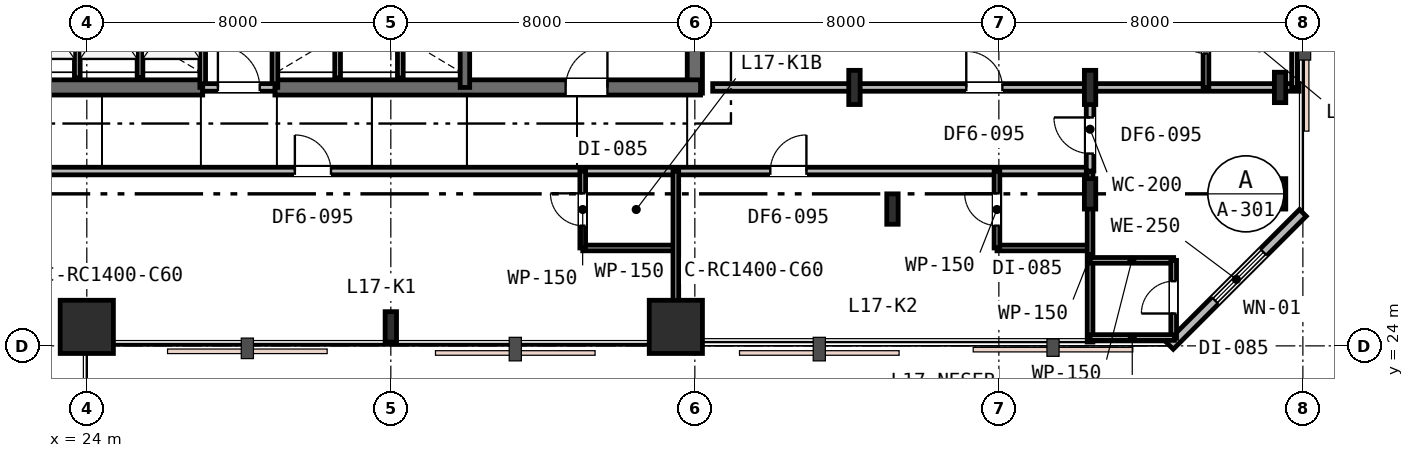
"""IFC4 building model, lengths in metres.
Left out: names, types, materials, properties, quantities, classifications, styles, units other than length and angle.
Written with IfcOpenShell. Run it as: python <this file> out.ifc"""

import sys

from ifc_helpers import new_model, si_unit, direction, frame, frame_2d, origin, origin_2d, place, context, subcontext, project, spatial, rectangle, i_section, extrude, element, fill, save


model = new_model("IFC4")
c1 = context("Model", 3, precision=1e-05, world=origin(), true_north=direction((0.0, 1.0)))
c2 = subcontext(c1, "Body", "Model", "MODEL_VIEW")
j1 = project(units=[si_unit("LENGTHUNIT", "METRE"), si_unit("PLANEANGLEUNIT", "RADIAN")], contexts=[c1])
p1 = place(None, origin())
s1 = spatial("IfcSite", under=j1, at=p1, CompositionType="ELEMENT")
p2 = place(p1, origin())
s2 = spatial("IfcBuilding", under=s1, at=p2, CompositionType="ELEMENT")
p3 = place(p2, frame((0.0, 0.0, 69.0)))
s3 = spatial("IfcBuildingStorey", under=s2, at=p3, CompositionType="ELEMENT", Elevation=69.0)
p4 = place(p3, frame((40.0, 30.65, 0.0), z_axis=(0.0, 0.0, 1.0), x_axis=(0.0, 1.0, 0.0)))
e1 = element("IfcWall", 1, at=p4, inside=s3, PredefinedType="SHEAR", context=c2, shape_type="SweptSolid", body=[
    extrude(rectangle(XDim=12.3, YDim=0.4, at=frame_2d((6.15, 0.0))), origin(), (0.0, 0.0, 1.0), 3.6),
])
p5 = place(p3, frame((15.85, 30.8, 0.0), z_axis=(0.0, 0.0, 1.0), x_axis=(1.0, 0.0, 0.0)))
e2 = element("IfcWall", 2, at=p5, inside=s3, PredefinedType="SHEAR", context=c2, shape_type="SweptSolid", body=[
    extrude(rectangle(XDim=11.2, YDim=0.4, at=frame_2d((5.6, 0.0))), origin(), (0.0, 0.0, 1.0), 3.6),
])
p6 = place(p5, frame((2.45, 0.0, 0.0)))
e3 = element("IfcOpeningElement", 3, at=p6, cuts=e2, PredefinedType="OPENING", context=c2, shape_type="SweptSolid", body=[
    extrude(rectangle(XDim=1.1, YDim=2.15, at=frame_2d((0.55, 1.075))), frame((0.0, 0.21, 0.0), z_axis=(0.0, -1.0, 0.0), x_axis=(1.0, 0.0, 0.0)), (0.0, 0.0, 1.0), 0.42),
])
p7 = place(p3, frame((28.95, 30.8, 0.0), z_axis=(0.0, 0.0, 1.0), x_axis=(1.0, 0.0, 0.0)))
e4 = element("IfcWall", 4, at=p7, inside=s3, PredefinedType="SHEAR", context=c2, shape_type="SweptSolid", body=[
    extrude(rectangle(XDim=11.2, YDim=0.4, at=frame_2d((5.6, 0.0))), origin(), (0.0, 0.0, 1.0), 3.6),
])
p8 = place(p7, frame((7.65, 0.0, 0.0)))
e5 = element("IfcOpeningElement", 5, at=p8, cuts=e4, PredefinedType="OPENING", context=c2, shape_type="SweptSolid", body=[
    extrude(rectangle(XDim=1.1, YDim=2.15, at=frame_2d((0.55, 1.075))), frame((0.0, 0.21, 0.0), z_axis=(0.0, -1.0, 0.0), x_axis=(1.0, 0.0, 0.0)), (0.0, 0.0, 1.0), 0.42),
])
p9 = place(p3, frame((33.95, 30.8, 0.0), z_axis=(0.0, 0.0, 1.0), x_axis=(0.0, 1.0, 0.0)))
e6 = element("IfcWall", 6, at=p9, inside=s3, PredefinedType="SHEAR", context=c2, shape_type="SweptSolid", body=[
    extrude(rectangle(XDim=6.45, YDim=0.25, at=frame_2d((3.225, 0.0))), origin(), (0.0, 0.0, 1.0), 3.6),
])
p10 = place(p3, frame((24.0, 24.5, 0.0), z_axis=(0.0, 0.0, 1.0), x_axis=(1.0, 0.0, 0.0)))
e7 = element("IfcColumn", 7, at=p10, inside=s3, PredefinedType="COLUMN", context=c2, shape_type="SweptSolid", body=[
    extrude(rectangle(XDim=1.4, YDim=1.4, at=origin_2d()), origin(), (0.0, 0.0, 1.0), 3.6),
])
p11 = place(p3, frame((32.0, 24.5, 0.0), z_axis=(0.0, 0.0, 1.0), x_axis=(1.0, 0.0, 0.0)))
e8 = element("IfcColumn", 8, at=p11, inside=s3, PredefinedType="COLUMN", context=c2, shape_type="SweptSolid", body=[
    extrude(i_section(OverallWidth=0.3, OverallDepth=0.8, WebThickness=0.018, FlangeThickness=0.033, FilletRadius=0.03, at=origin_2d()), origin(), (0.0, 0.0, 1.0), 3.6),
])
p12 = place(p3, frame((39.5, 24.5, 0.0), z_axis=(0.0, 0.0, 1.0), x_axis=(1.0, 0.0, 0.0)))
e9 = element("IfcColumn", 9, at=p12, inside=s3, PredefinedType="COLUMN", context=c2, shape_type="SweptSolid", body=[
    extrude(rectangle(XDim=1.4, YDim=1.4, at=origin_2d()), origin(), (0.0, 0.0, 1.0), 3.6),
])
for number, where, z_axis, x_axis in (
    (10, (45.2, 27.6, 0.0), (0.0, 0.0, 1.0), (1.0, 0.0, 0.0)),
    (11, (50.4, 28.0, 0.0), (0.0, 0.0, 1.0), (1.0, 0.0, 0.0)),
    (12, (55.4, 28.0, 0.0), (0.0, 0.0, 1.0), (1.0, 0.0, 0.0)),
    (13, (55.4, 30.8, 0.0), (0.0, 0.0, 1.0), (1.0, 0.0, 0.0)),
):
    element("IfcColumn", number, at=place(p3, frame(where, z_axis=z_axis, x_axis=x_axis)), inside=s3, PredefinedType="COLUMN", context=c2, shape_type="SweptSolid", body=[
        extrude(i_section(OverallWidth=0.3, OverallDepth=0.8, WebThickness=0.018, FlangeThickness=0.033, FilletRadius=0.03, at=origin_2d()), origin(), (0.0, 0.0, 1.0), 3.6),
    ])
for number, where, z_axis, x_axis in (
    (14, (44.2, 30.8, 0.0), (0.0, 0.0, 1.0), (1.0, 0.0, 0.0)),
    (15, (50.4, 30.8, 0.0), (0.0, 0.0, 1.0), (1.0, 0.0, 0.0)),
):
    element("IfcColumn", number, at=place(p3, frame(where, z_axis=z_axis, x_axis=x_axis)), inside=s3, PredefinedType="COLUMN", context=c2, shape_type="SweptSolid", body=[
        extrude(i_section(OverallWidth=0.3, OverallDepth=0.9, WebThickness=0.018, FlangeThickness=0.035, FilletRadius=0.03, at=origin_2d()), origin(), (0.0, 0.0, 1.0), 3.6),
    ])
p13 = place(p3, frame((52.5, 24.0, 0.0), z_axis=(0.0, 0.0, 1.0), x_axis=(0.707106781187, 0.707106781187, 0.0)))
e16 = element("IfcWall", 16, at=p13, inside=s3, PredefinedType="STANDARD", context=c2, shape_type="SweptSolid", body=[
    extrude(rectangle(XDim=4.95, YDim=0.25, at=frame_2d((2.475, 0.0))), origin(), (0.0, 0.0, 1.0), 3.33),
])
p14 = place(p13, frame((1.685, 0.0, 0.75)))
e17 = element("IfcOpeningElement", 17, at=p14, cuts=e16, PredefinedType="OPENING", context=c2, shape_type="SweptSolid", body=[
    extrude(rectangle(XDim=1.8, YDim=1.85, at=frame_2d((0.9, 0.925))), frame((0.0, 0.135, 0.0), z_axis=(0.0, -1.0, 0.0), x_axis=(1.0, 0.0, 0.0)), (0.0, 0.0, 1.0), 0.27),
])
for number, where, z_axis, x_axis in (
    (18, (27.05, 30.8, 0.0), (0.0, 0.0, 1.0), (0.0, 1.0, 0.0)),
    (19, (28.95, 30.8, 0.0), (0.0, 0.0, 1.0), (0.0, 1.0, 0.0)),
):
    element("IfcWall", number, at=place(p3, frame(where, z_axis=z_axis, x_axis=x_axis)), inside=s3, PredefinedType="PLUMBINGWALL", context=c2, shape_type="SweptSolid", body=[
        extrude(rectangle(XDim=3.45, YDim=0.15, at=frame_2d((1.725, 0.0))), origin(), (0.0, 0.0, 1.0), 3.33),
    ])
p15 = place(p3, frame((27.05, 30.8, 0.0), z_axis=(0.0, 0.0, 1.0), x_axis=(1.0, 0.0, 0.0)))
e20 = element("IfcWall", 20, at=p15, inside=s3, PredefinedType="PARTITIONING", context=c2, shape_type="SweptSolid", body=[
    extrude(rectangle(XDim=1.9, YDim=0.2, at=frame_2d((0.95, 0.0))), origin(), (0.0, 0.0, 1.0), 3.33),
])
p16 = place(p15, frame((0.4, 0.0, 0.0)))
e21 = element("IfcOpeningElement", 21, at=p16, cuts=e20, PredefinedType="OPENING", context=c2, shape_type="SweptSolid", body=[
    extrude(rectangle(XDim=1.1, YDim=2.15, at=frame_2d((0.55, 1.075))), frame((0.0, 0.11, 0.0), z_axis=(0.0, -1.0, 0.0), x_axis=(1.0, 0.0, 0.0)), (0.0, 0.0, 1.0), 0.22),
])
for number, where, z_axis, x_axis in (
    (22, (23.75, 31.05, 0.0), (0.0, 0.0, 1.0), (0.0, 1.0, 0.0)),
    (23, (25.4, 31.05, 0.0), (0.0, 0.0, 1.0), (0.0, 1.0, 0.0)),
    (24, (30.6, 31.05, 0.0), (0.0, 0.0, 1.0), (0.0, 1.0, 0.0)),
    (25, (32.25, 31.05, 0.0), (0.0, 0.0, 1.0), (0.0, 1.0, 0.0)),
):
    element("IfcWall", number, at=place(p3, frame(where, z_axis=z_axis, x_axis=x_axis)), inside=s3, PredefinedType="PLUMBINGWALL", context=c2, shape_type="SweptSolid", body=[
        extrude(rectangle(XDim=3.1, YDim=0.15, at=frame_2d((1.55, 0.0))), origin(), (0.0, 0.0, 1.0), 3.33),
    ])
p17 = place(p3, frame((14.0, 28.6, 0.0), z_axis=(0.0, 0.0, 1.0), x_axis=(1.0, 0.0, 0.0)))
e26 = element("IfcWall", 26, at=p17, inside=s3, PredefinedType="PARTITIONING", context=c2, shape_type="SweptSolid", body=[
    extrude(rectangle(XDim=36.4, YDim=0.2, at=frame_2d((18.2, 0.0))), origin(), (0.0, 0.0, 1.0), 2.83),
])
p18 = place(p17, frame((15.475, 0.0, 0.0)))
e27 = element("IfcOpeningElement", 27, at=p18, cuts=e26, PredefinedType="OPENING", context=c2, shape_type="SweptSolid", body=[
    extrude(rectangle(XDim=0.95, YDim=2.15, at=frame_2d((0.475, 1.075))), frame((0.0, 0.11, 0.0), z_axis=(0.0, -1.0, 0.0), x_axis=(1.0, 0.0, 0.0)), (0.0, 0.0, 1.0), 0.22),
])
p19 = place(p17, frame((27.986, 0.0, 0.0)))
e28 = element("IfcOpeningElement", 28, at=p19, cuts=e26, PredefinedType="OPENING", context=c2, shape_type="SweptSolid", body=[
    extrude(rectangle(XDim=0.95, YDim=2.15, at=frame_2d((0.475, 1.075))), frame((0.0, 0.11, 0.0), z_axis=(0.0, -1.0, 0.0), x_axis=(1.0, 0.0, 0.0)), (0.0, 0.0, 1.0), 0.22),
])
p20 = place(p3, frame((37.05, 26.576, 0.0), z_axis=(0.0, 0.0, 1.0), x_axis=(1.0, 0.0, 0.0)))
e29 = element("IfcWall", 29, at=p20, inside=s3, PredefinedType="PARTITIONING", context=c2, shape_type="SweptSolid", body=[
    extrude(rectangle(XDim=2.45, YDim=0.15, at=frame_2d((1.225, 0.0))), origin(), (0.0, 0.0, 1.0), 2.83),
])
p21 = place(p3, frame((37.05, 26.576, 0.0), z_axis=(0.0, 0.0, 1.0), x_axis=(0.0, 1.0, 0.0)))
e30 = element("IfcWall", 30, at=p21, inside=s3, PredefinedType="PARTITIONING", context=c2, shape_type="SweptSolid", body=[
    extrude(rectangle(XDim=2.024, YDim=0.15, at=frame_2d((1.012, 0.0))), origin(), (0.0, 0.0, 1.0), 3.02),
])
p22 = place(p21, frame((0.587, 0.0, 0.0)))
e31 = element("IfcOpeningElement", 31, at=p22, cuts=e30, PredefinedType="OPENING", context=c2, shape_type="SweptSolid", body=[
    extrude(rectangle(XDim=0.85, YDim=2.15, at=frame_2d((0.425, 1.075))), frame((0.0, 0.085, 0.0), z_axis=(0.0, -1.0, 0.0), x_axis=(1.0, 0.0, 0.0)), (0.0, 0.0, 1.0), 0.17),
])
p23 = place(p3, frame((39.5, 28.6, 0.0), z_axis=(0.0, 0.0, 1.0), x_axis=(0.0, -1.0, 0.0)))
e32 = element("IfcWall", 32, at=p23, inside=s3, PredefinedType="PARTITIONING", context=c2, shape_type="SweptSolid", body=[
    extrude(rectangle(XDim=4.5, YDim=0.15, at=frame_2d((2.25, 0.0))), origin(), (0.0, 0.0, 1.0), 2.83),
])
p24 = place(p3, frame((47.95, 26.576, 0.0), z_axis=(0.0, 0.0, 1.0), x_axis=(1.0, 0.0, 0.0)))
e33 = element("IfcWall", 33, at=p24, inside=s3, PredefinedType="PARTITIONING", context=c2, shape_type="SweptSolid", body=[
    extrude(rectangle(XDim=2.45, YDim=0.15, at=frame_2d((1.225, 0.0))), origin(), (0.0, 0.0, 1.0), 3.33),
])
p25 = place(p3, frame((47.95, 26.576, 0.0), z_axis=(0.0, 0.0, 1.0), x_axis=(0.0, 1.0, 0.0)))
e34 = element("IfcWall", 34, at=p25, inside=s3, PredefinedType="PARTITIONING", context=c2, shape_type="SweptSolid", body=[
    extrude(rectangle(XDim=2.024, YDim=0.15, at=frame_2d((1.012, 0.0))), origin(), (0.0, 0.0, 1.0), 3.33),
])
p26 = place(p25, frame((0.587, 0.0, 0.0)))
e35 = element("IfcOpeningElement", 35, at=p26, cuts=e34, PredefinedType="OPENING", context=c2, shape_type="SweptSolid", body=[
    extrude(rectangle(XDim=0.85, YDim=2.15, at=frame_2d((0.425, 1.075))), frame((0.0, 0.085, 0.0), z_axis=(0.0, -1.0, 0.0), x_axis=(1.0, 0.0, 0.0)), (0.0, 0.0, 1.0), 0.17),
])
p27 = place(p3, frame((50.4, 28.6, 0.0), z_axis=(0.0, 0.0, 1.0), x_axis=(0.0, -1.0, 0.0)))
e36 = element("IfcWall", 36, at=p27, inside=s3, PredefinedType="PARTITIONING", context=c2, shape_type="SweptSolid", body=[
    extrude(rectangle(XDim=4.5, YDim=0.15, at=frame_2d((2.25, 0.0))), origin(), (0.0, 0.0, 1.0), 2.83),
])
p28 = place(p3, frame((40.47, 30.8, 0.0), z_axis=(0.0, 0.0, 1.0), x_axis=(1.0, 0.0, 0.0)))
e37 = element("IfcWall", 37, at=p28, inside=s3, PredefinedType="PARTITIONING", context=c2, shape_type="SweptSolid", body=[
    extrude(rectangle(XDim=15.43, YDim=0.2, at=frame_2d((7.715, 0.0))), origin(), (0.0, 0.0, 1.0), 2.83),
])
p29 = place(p28, frame((6.673, 0.0, 0.0)))
e38 = element("IfcOpeningElement", 38, at=p29, cuts=e37, PredefinedType="OPENING", context=c2, shape_type="SweptSolid", body=[
    extrude(rectangle(XDim=0.95, YDim=2.15, at=frame_2d((0.475, 1.075))), frame((0.0, 0.11, 0.0), z_axis=(0.0, -1.0, 0.0), x_axis=(1.0, 0.0, 0.0)), (0.0, 0.0, 1.0), 0.22),
])
p30 = place(p3, frame((53.45, 30.8, 0.0), z_axis=(0.0, 0.0, 1.0), x_axis=(0.0, 1.0, 0.0)))
e39 = element("IfcWall", 39, at=p30, inside=s3, PredefinedType="PARTITIONING", context=c2, shape_type="SweptSolid", body=[
    extrude(rectangle(XDim=2.2, YDim=0.15, at=frame_2d((1.1, 0.0))), origin(), (0.0, 0.0, 1.0), 2.83),
])
p31 = place(p30, frame((0.892, 0.0, 0.0)))
e40 = element("IfcOpeningElement", 40, at=p31, cuts=e39, PredefinedType="OPENING", context=c2, shape_type="SweptSolid", body=[
    extrude(rectangle(XDim=0.85, YDim=2.15, at=frame_2d((0.425, 1.075))), frame((0.0, 0.085, 0.0), z_axis=(0.0, -1.0, 0.0), x_axis=(1.0, 0.0, 0.0)), (0.0, 0.0, 1.0), 0.17),
])
p32 = place(p3, frame((55.78, 33.0, 0.0), z_axis=(0.0, 0.0, 1.0), x_axis=(0.0, -1.0, 0.0)))
e41 = element("IfcWall", 41, at=p32, inside=s3, PredefinedType="PARTITIONING", context=c2, shape_type="SweptSolid", body=[
    extrude(rectangle(XDim=2.2, YDim=0.15, at=frame_2d((1.1, 0.0))), origin(), (0.0, 0.0, 1.0), 2.83),
])
p33 = place(p3, frame((50.4, 28.6, 0.0), z_axis=(0.0, 0.0, 1.0), x_axis=(0.0, 1.0, 0.0)))
e42 = element("IfcWall", 42, at=p33, inside=s3, PredefinedType="PARTITIONING", context=c2, shape_type="SweptSolid", body=[
    extrude(rectangle(XDim=2.2, YDim=0.2, at=frame_2d((1.1, 0.0))), origin(), (0.0, 0.0, 1.0), 2.83),
])
p34 = place(p33, frame((0.46, 0.0, 0.0)))
e43 = element("IfcOpeningElement", 43, at=p34, cuts=e42, PredefinedType="OPENING", context=c2, shape_type="SweptSolid", body=[
    extrude(rectangle(XDim=0.95, YDim=2.15, at=frame_2d((0.475, 1.075))), frame((0.0, 0.11, 0.0), z_axis=(0.0, -1.0, 0.0), x_axis=(1.0, 0.0, 0.0)), (0.0, 0.0, 1.0), 0.22),
])
p35 = place(p3, frame((50.4, 26.25, 0.0), z_axis=(0.0, 0.0, 1.0), x_axis=(1.0, 0.0, 0.0)))
e44 = element("IfcWall", 44, at=p35, inside=s3, PredefinedType="PARTITIONING", context=c2, shape_type="SweptSolid", body=[
    extrude(rectangle(XDim=2.2, YDim=0.15, at=frame_2d((1.1, 0.0))), origin(), (0.0, 0.0, 1.0), 3.33),
])
p36 = place(p3, frame((52.6, 24.2, 0.0), z_axis=(0.0, 0.0, 1.0), x_axis=(0.0, 1.0, 0.0)))
e45 = element("IfcWall", 45, at=p36, inside=s3, PredefinedType="PARTITIONING", context=c2, shape_type="SweptSolid", body=[
    extrude(rectangle(XDim=2.05, YDim=0.15, at=frame_2d((1.025, 0.0))), origin(), (0.0, 0.0, 1.0), 3.33),
])
p37 = place(p36, frame((0.651, 0.0, 0.0)))
e46 = element("IfcOpeningElement", 46, at=p37, cuts=e45, PredefinedType="OPENING", context=c2, shape_type="SweptSolid", body=[
    extrude(rectangle(XDim=0.85, YDim=2.15, at=frame_2d((0.425, 1.075))), frame((0.0, 0.085, 0.0), z_axis=(0.0, -1.0, 0.0), x_axis=(1.0, 0.0, 0.0)), (0.0, 0.0, 1.0), 0.17),
])
p38 = place(p3, frame((52.62, 24.22, 0.0), z_axis=(0.0, 0.0, 1.0), x_axis=(-1.0, 0.0, 0.0)))
e47 = element("IfcWall", 47, at=p38, inside=s3, PredefinedType="PARTITIONING", context=c2, shape_type="SweptSolid", body=[
    extrude(rectangle(XDim=2.22, YDim=0.15, at=frame_2d((1.11, 0.0))), origin(), (0.0, 0.0, 1.0), 3.33),
])
p39 = place(p14, origin())
e48 = element("IfcWindow", 48, at=p39, inside=s3, PartitioningType="SINGLE_PANEL", PredefinedType="WINDOW", context=c2, shape_type="SweptSolid", body=[
    extrude(rectangle(XDim=1.8, YDim=1.85, at=frame_2d((0.9, 0.925))), frame((0.0, 0.03, 0.0), z_axis=(0.0, -1.0, 0.0), x_axis=(1.0, 0.0, 0.0)), (0.0, 0.0, 1.0), 0.06),
])
fill(e17, e48)
p40 = place(p16, origin())
e49 = element("IfcDoor", 49, at=p40, inside=s3, OperationType="SINGLE_SWING_LEFT", PredefinedType="DOOR", context=c2, shape_type="SweptSolid", body=[
    extrude(rectangle(XDim=1.1, YDim=2.15, at=frame_2d((0.55, 1.075))), frame((0.0, 0.025, 0.0), z_axis=(0.0, -1.0, 0.0), x_axis=(1.0, 0.0, 0.0)), (0.0, 0.0, 1.0), 0.05),
])
fill(e21, e49)
p41 = place(p8, origin())
e50 = element("IfcDoor", 50, at=p41, inside=s3, OperationType="SINGLE_SWING_RIGHT", PredefinedType="DOOR", context=c2, shape_type="SweptSolid", body=[
    extrude(rectangle(XDim=1.1, YDim=2.15, at=frame_2d((0.55, 1.075))), frame((0.0, 0.025, 0.0), z_axis=(0.0, -1.0, 0.0), x_axis=(1.0, 0.0, 0.0)), (0.0, 0.0, 1.0), 0.05),
])
fill(e5, e50)
p42 = place(p18, origin())
e51 = element("IfcDoor", 51, at=p42, inside=s3, OperationType="SINGLE_SWING_LEFT", PredefinedType="DOOR", context=c2, shape_type="SweptSolid", body=[
    extrude(rectangle(XDim=0.95, YDim=2.15, at=frame_2d((0.475, 1.075))), frame((0.0, 0.025, 0.0), z_axis=(0.0, -1.0, 0.0), x_axis=(1.0, 0.0, 0.0)), (0.0, 0.0, 1.0), 0.05),
])
fill(e27, e51)
p43 = place(p22, origin())
e52 = element("IfcDoor", 52, at=p43, inside=s3, OperationType="SINGLE_SWING_RIGHT", PredefinedType="DOOR", context=c2, shape_type="SweptSolid", body=[
    extrude(rectangle(XDim=0.85, YDim=2.15, at=frame_2d((0.425, 1.075))), frame((0.0, 0.025, 0.0), z_axis=(0.0, -1.0, 0.0), x_axis=(1.0, 0.0, 0.0)), (0.0, 0.0, 1.0), 0.05),
])
fill(e31, e52)
p44 = place(p19, origin())
e53 = element("IfcDoor", 53, at=p44, inside=s3, OperationType="SINGLE_SWING_RIGHT", PredefinedType="DOOR", context=c2, shape_type="SweptSolid", body=[
    extrude(rectangle(XDim=0.95, YDim=2.15, at=frame_2d((0.475, 1.075))), frame((0.0, 0.025, 0.0), z_axis=(0.0, -1.0, 0.0), x_axis=(1.0, 0.0, 0.0)), (0.0, 0.0, 1.0), 0.05),
])
fill(e28, e53)
p45 = place(p26, origin())
e54 = element("IfcDoor", 54, at=p45, inside=s3, OperationType="SINGLE_SWING_RIGHT", PredefinedType="DOOR", context=c2, shape_type="SweptSolid", body=[
    extrude(rectangle(XDim=0.85, YDim=2.15, at=frame_2d((0.425, 1.075))), frame((0.0, 0.025, 0.0), z_axis=(0.0, -1.0, 0.0), x_axis=(1.0, 0.0, 0.0)), (0.0, 0.0, 1.0), 0.05),
])
fill(e35, e54)
p46 = place(p29, origin())
e55 = element("IfcDoor", 55, at=p46, inside=s3, OperationType="SINGLE_SWING_LEFT", PredefinedType="DOOR", context=c2, shape_type="SweptSolid", body=[
    extrude(rectangle(XDim=0.95, YDim=2.15, at=frame_2d((0.475, 1.075))), frame((0.0, 0.025, 0.0), z_axis=(0.0, -1.0, 0.0), x_axis=(1.0, 0.0, 0.0)), (0.0, 0.0, 1.0), 0.05),
])
fill(e38, e55)
p47 = place(p31, origin())
e56 = element("IfcDoor", 56, at=p47, inside=s3, OperationType="SINGLE_SWING_RIGHT", PredefinedType="DOOR", context=c2, shape_type="SweptSolid", body=[
    extrude(rectangle(XDim=0.85, YDim=2.15, at=frame_2d((0.425, 1.075))), frame((0.0, 0.025, 0.0), z_axis=(0.0, -1.0, 0.0), x_axis=(1.0, 0.0, 0.0)), (0.0, 0.0, 1.0), 0.05),
])
fill(e40, e56)
p48 = place(p34, origin())
e57 = element("IfcDoor", 57, at=p48, inside=s3, OperationType="SINGLE_SWING_RIGHT", PredefinedType="DOOR", context=c2, shape_type="SweptSolid", body=[
    extrude(rectangle(XDim=0.95, YDim=2.15, at=frame_2d((0.475, 1.075))), frame((0.0, 0.025, 0.0), z_axis=(0.0, -1.0, 0.0), x_axis=(1.0, 0.0, 0.0)), (0.0, 0.0, 1.0), 0.05),
])
fill(e43, e57)
p49 = place(p37, origin())
e58 = element("IfcDoor", 58, at=p49, inside=s3, OperationType="SINGLE_SWING_LEFT", PredefinedType="DOOR", context=c2, shape_type="SweptSolid", body=[
    extrude(rectangle(XDim=0.85, YDim=2.15, at=frame_2d((0.425, 1.075))), frame((0.0, 0.025, 0.0), z_axis=(0.0, -1.0, 0.0), x_axis=(1.0, 0.0, 0.0)), (0.0, 0.0, 1.0), 0.05),
])
fill(e46, e58)
save(model, sys.argv[1])
